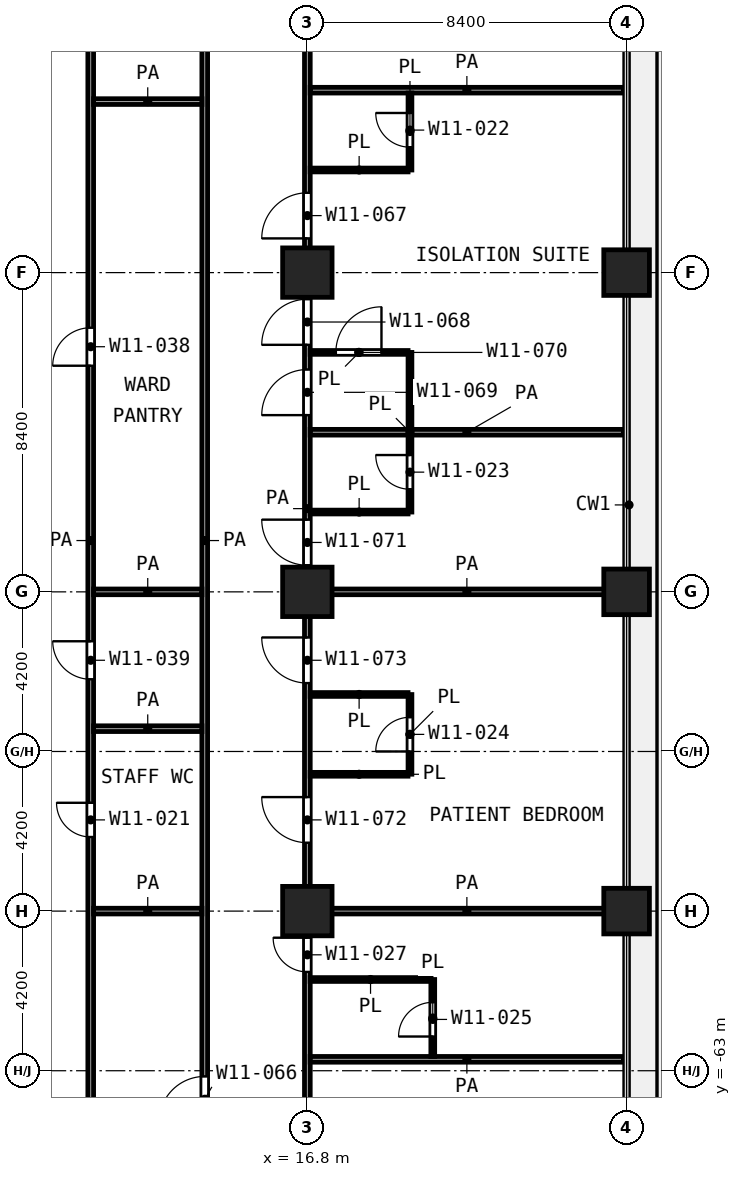
"""IFC4 building model, lengths in metres.
Left out: names, types, materials, properties, quantities, classifications, styles, units other than length and angle.
Written with IfcOpenShell. Run it as: python <this file> out.ifc"""

import sys

from ifc_helpers import new_model, si_unit, direction, frame, frame_2d, origin, origin_2d, place, context, subcontext, project, spatial, rectangle, extrude, element, fill, save


model = new_model("IFC4")
c1 = context("Model", 3, precision=1e-05, world=origin(), true_north=direction((0.0, 1.0)))
c2 = subcontext(c1, "Body", "Model", "MODEL_VIEW")
j1 = project(units=[si_unit("LENGTHUNIT", "METRE"), si_unit("PLANEANGLEUNIT", "RADIAN")], contexts=[c1])
p1 = place(None, origin())
s1 = spatial("IfcSite", under=j1, at=p1, CompositionType="ELEMENT")
p2 = place(p1, origin())
s2 = spatial("IfcBuilding", under=s1, at=p2, CompositionType="ELEMENT")
p3 = place(p2, frame((0.0, 0.0, 51.8)))
s3 = spatial("IfcBuildingStorey", under=s2, at=p3, CompositionType="ELEMENT", Elevation=51.8)
p4 = place(p3, frame((16.8, -42.0, 0.0), z_axis=(0.0, 0.0, 1.0), x_axis=(1.0, 0.0, 0.0)))
e1 = element("IfcColumn", 1, at=p4, inside=s3, PredefinedType="COLUMN", context=c2, shape_type="SweptSolid", body=[
    extrude(rectangle(XDim=1.3, YDim=1.3, at=origin_2d()), origin(), (0.0, 0.0, 1.0), 4.2),
])
p5 = place(p3, frame((25.2, -42.0, 0.0), z_axis=(0.0, 0.0, 1.0), x_axis=(1.0, 0.0, 0.0)))
e2 = element("IfcColumn", 2, at=p5, inside=s3, PredefinedType="COLUMN", context=c2, shape_type="SweptSolid", body=[
    extrude(rectangle(XDim=1.2, YDim=1.2, at=origin_2d()), origin(), (0.0, 0.0, 1.0), 4.2),
])
p6 = place(p3, frame((16.8, -50.4, 0.0), z_axis=(0.0, 0.0, 1.0), x_axis=(1.0, 0.0, 0.0)))
e3 = element("IfcColumn", 3, at=p6, inside=s3, PredefinedType="COLUMN", context=c2, shape_type="SweptSolid", body=[
    extrude(rectangle(XDim=1.3, YDim=1.3, at=origin_2d()), origin(), (0.0, 0.0, 1.0), 4.2),
])
p7 = place(p3, frame((25.2, -50.4, 0.0), z_axis=(0.0, 0.0, 1.0), x_axis=(1.0, 0.0, 0.0)))
e4 = element("IfcColumn", 4, at=p7, inside=s3, PredefinedType="COLUMN", context=c2, shape_type="SweptSolid", body=[
    extrude(rectangle(XDim=1.2, YDim=1.2, at=origin_2d()), origin(), (0.0, 0.0, 1.0), 4.2),
])
p8 = place(p3, frame((16.8, -58.8, 0.0), z_axis=(0.0, 0.0, 1.0), x_axis=(1.0, 0.0, 0.0)))
e5 = element("IfcColumn", 5, at=p8, inside=s3, PredefinedType="COLUMN", context=c2, shape_type="SweptSolid", body=[
    extrude(rectangle(XDim=1.3, YDim=1.3, at=origin_2d()), origin(), (0.0, 0.0, 1.0), 4.2),
])
p9 = place(p3, frame((25.2, -58.8, 0.0), z_axis=(0.0, 0.0, 1.0), x_axis=(1.0, 0.0, 0.0)))
e6 = element("IfcColumn", 6, at=p9, inside=s3, PredefinedType="COLUMN", context=c2, shape_type="SweptSolid", body=[
    extrude(rectangle(XDim=1.2, YDim=1.2, at=origin_2d()), origin(), (0.0, 0.0, 1.0), 4.2),
])
p10 = place(p3, frame((16.875, -60.6, 0.0), z_axis=(0.0, 0.0, 1.0), x_axis=(1.0, 0.0, 0.0)))
e7 = element("IfcWall", 7, at=p10, inside=s3, PredefinedType="PARTITIONING", context=c2, shape_type="SweptSolid", body=[
    extrude(rectangle(XDim=3.175, YDim=0.1, at=frame_2d((1.587, 0.0))), origin(), (0.0, 0.0, 1.0), 3.9),
])
p11 = place(p3, frame((16.875, -55.2, 0.0), z_axis=(0.0, 0.0, 1.0), x_axis=(1.0, 0.0, 0.0)))
e8 = element("IfcWall", 8, at=p11, inside=s3, PredefinedType="PARTITIONING", context=c2, shape_type="SweptSolid", body=[
    extrude(rectangle(XDim=2.573, YDim=0.1, at=frame_2d((1.287, 0.0))), origin(), (0.0, 0.0, 1.0), 3.9),
])
p12 = place(p3, frame((16.875, -53.1, 0.0), z_axis=(0.0, 0.0, 1.0), x_axis=(1.0, 0.0, 0.0)))
e9 = element("IfcWall", 9, at=p12, inside=s3, PredefinedType="PARTITIONING", context=c2, shape_type="SweptSolid", body=[
    extrude(rectangle(XDim=2.574, YDim=0.1, at=frame_2d((1.287, 0.0))), origin(), (0.0, 0.0, 1.0), 3.9),
])
p13 = place(p3, frame((16.875, -48.3, 0.0), z_axis=(0.0, 0.0, 1.0), x_axis=(1.0, 0.0, 0.0)))
e10 = element("IfcWall", 10, at=p13, inside=s3, PredefinedType="PARTITIONING", context=c2, shape_type="SweptSolid", body=[
    extrude(rectangle(XDim=2.575, YDim=0.1, at=frame_2d((1.288, 0.0))), origin(), (0.0, 0.0, 1.0), 3.9),
])
p14 = place(p3, frame((16.875, -44.1, 0.0), z_axis=(0.0, 0.0, 1.0), x_axis=(1.0, 0.0, 0.0)))
e11 = element("IfcWall", 11, at=p14, inside=s3, PredefinedType="PARTITIONING", context=c2, shape_type="SweptSolid", body=[
    extrude(rectangle(XDim=2.575, YDim=0.1, at=frame_2d((1.288, 0.0))), origin(), (0.0, 0.0, 1.0), 3.9),
])
p15 = place(p14, frame((0.675, 0.0, 0.0)))
e12 = element("IfcOpeningElement", 12, at=p15, cuts=e11, PredefinedType="OPENING", context=c2, shape_type="SweptSolid", body=[
    extrude(rectangle(XDim=1.2, YDim=2.1, at=frame_2d((0.6, 1.05))), frame((0.0, 0.06, 0.0), z_axis=(0.0, -1.0, 0.0), x_axis=(1.0, 0.0, 0.0)), (0.0, 0.0, 1.0), 0.12),
])
p16 = place(p3, frame((16.875, -39.3, 0.0), z_axis=(0.0, 0.0, 1.0), x_axis=(1.0, 0.0, 0.0)))
e13 = element("IfcWall", 13, at=p16, inside=s3, PredefinedType="PARTITIONING", context=c2, shape_type="SweptSolid", body=[
    extrude(rectangle(XDim=2.575, YDim=0.1, at=frame_2d((1.288, 0.0))), origin(), (0.0, 0.0, 1.0), 3.9),
])
p17 = place(p3, frame((19.5, -55.198, 0.0), z_axis=(0.0, 0.0, 1.0), x_axis=(0.0, 1.0, 0.0)))
e14 = element("IfcWall", 14, at=p17, inside=s3, PredefinedType="PARTITIONING", context=c2, shape_type="SweptSolid", body=[
    extrude(rectangle(XDim=2.096, YDim=0.1, at=frame_2d((1.048, 0.0))), origin(), (0.0, 0.0, 1.0), 3.9),
])
p18 = place(p17, frame((0.598, 0.0, 0.0)))
e15 = element("IfcOpeningElement", 15, at=p18, cuts=e14, PredefinedType="OPENING", context=c2, shape_type="SweptSolid", body=[
    extrude(rectangle(XDim=0.9, YDim=2.1, at=frame_2d((0.45, 1.05))), frame((0.0, 0.06, 0.0), z_axis=(0.0, -1.0, 0.0), x_axis=(1.0, 0.0, 0.0)), (0.0, 0.0, 1.0), 0.12),
])
p19 = place(p3, frame((19.5, -48.3, 0.0), z_axis=(0.0, 0.0, 1.0), x_axis=(0.0, 1.0, 0.0)))
e16 = element("IfcWall", 16, at=p19, inside=s3, PredefinedType="PARTITIONING", context=c2, shape_type="SweptSolid", body=[
    extrude(rectangle(XDim=4.2, YDim=0.1, at=frame_2d((2.1, 0.0))), origin(), (0.0, 0.0, 1.0), 3.9),
])
p20 = place(p19, frame((0.6, 0.0, 0.0)))
e17 = element("IfcOpeningElement", 17, at=p20, cuts=e16, PredefinedType="OPENING", context=c2, shape_type="SweptSolid", body=[
    extrude(rectangle(XDim=0.9, YDim=2.1, at=frame_2d((0.45, 1.05))), frame((0.0, 0.06, 0.0), z_axis=(0.0, -1.0, 0.0), x_axis=(1.0, 0.0, 0.0)), (0.0, 0.0, 1.0), 0.12),
])
p21 = place(p3, frame((19.5, -39.3, 0.0), z_axis=(0.0, 0.0, 1.0), x_axis=(0.0, 1.0, 0.0)))
e18 = element("IfcWall", 18, at=p21, inside=s3, PredefinedType="PARTITIONING", context=c2, shape_type="SweptSolid", body=[
    extrude(rectangle(XDim=2.025, YDim=0.1, at=frame_2d((1.013, 0.0))), origin(), (0.0, 0.0, 1.0), 3.9),
])
p22 = place(p21, frame((0.6, 0.0, 0.0)))
e19 = element("IfcOpeningElement", 19, at=p22, cuts=e18, PredefinedType="OPENING", context=c2, shape_type="SweptSolid", body=[
    extrude(rectangle(XDim=0.9, YDim=2.1, at=frame_2d((0.45, 1.05))), frame((0.0, 0.06, 0.0), z_axis=(0.0, -1.0, 0.0), x_axis=(1.0, 0.0, 0.0)), (0.0, 0.0, 1.0), 0.12),
])
p23 = place(p3, frame((20.1, -62.625, 0.0), z_axis=(0.0, 0.0, 1.0), x_axis=(0.0, 1.0, 0.0)))
e20 = element("IfcWall", 20, at=p23, inside=s3, PredefinedType="PARTITIONING", context=c2, shape_type="SweptSolid", body=[
    extrude(rectangle(XDim=2.025, YDim=0.1, at=frame_2d((1.012, 0.0))), origin(), (0.0, 0.0, 1.0), 3.9),
])
p24 = place(p23, frame((0.525, 0.0, 0.0)))
e21 = element("IfcOpeningElement", 21, at=p24, cuts=e20, PredefinedType="OPENING", context=c2, shape_type="SweptSolid", body=[
    extrude(rectangle(XDim=0.9, YDim=2.1, at=frame_2d((0.45, 1.05))), frame((0.0, 0.06, 0.0), z_axis=(0.0, -1.0, 0.0), x_axis=(1.0, 0.0, 0.0)), (0.0, 0.0, 1.0), 0.12),
])
p25 = place(p3, frame((16.875, -62.7, 0.0), z_axis=(0.0, 0.0, 1.0), x_axis=(1.0, 0.0, 0.0)))
e22 = element("IfcWall", 22, at=p25, inside=s3, PredefinedType="PARTITIONING", context=c2, shape_type="SweptSolid", body=[
    extrude(rectangle(XDim=8.245, YDim=0.15, at=frame_2d((4.123, 0.0))), origin(), (0.0, 0.0, 1.0), 3.9),
])
p26 = place(p3, frame((11.175, -58.8, 0.0), z_axis=(0.0, 0.0, 1.0), x_axis=(1.0, 0.0, 0.0)))
e23 = element("IfcWall", 23, at=p26, inside=s3, PredefinedType="PARTITIONING", context=c2, shape_type="SweptSolid", body=[
    extrude(rectangle(XDim=2.85, YDim=0.15, at=frame_2d((1.425, 0.0))), origin(), (0.0, 0.0, 1.0), 3.9),
])
p27 = place(p3, frame((16.875, -58.8, 0.0), z_axis=(0.0, 0.0, 1.0), x_axis=(1.0, 0.0, 0.0)))
e24 = element("IfcWall", 24, at=p27, inside=s3, PredefinedType="PARTITIONING", context=c2, shape_type="SweptSolid", body=[
    extrude(rectangle(XDim=8.245, YDim=0.15, at=frame_2d((4.123, 0.0))), origin(), (0.0, 0.0, 1.0), 3.9),
])
for number, where, z_axis, x_axis in (
    (25, (11.175, -54.0, 0.0), (0.0, 0.0, 1.0), (1.0, 0.0, 0.0)),
    (26, (11.175, -50.4, 0.0), (0.0, 0.0, 1.0), (1.0, 0.0, 0.0)),
):
    element("IfcWall", number, at=place(p3, frame(where, z_axis=z_axis, x_axis=x_axis)), inside=s3, PredefinedType="PARTITIONING", context=c2, shape_type="SweptSolid", body=[
        extrude(rectangle(XDim=2.85, YDim=0.15, at=frame_2d((1.425, 0.0))), origin(), (0.0, 0.0, 1.0), 3.9),
    ])
for number, where, z_axis, x_axis in (
    (27, (16.875, -50.4, 0.0), (0.0, 0.0, 1.0), (1.0, 0.0, 0.0)),
    (28, (16.875, -46.2, 0.0), (0.0, 0.0, 1.0), (1.0, 0.0, 0.0)),
):
    element("IfcWall", number, at=place(p3, frame(where, z_axis=z_axis, x_axis=x_axis)), inside=s3, PredefinedType="PARTITIONING", context=c2, shape_type="SweptSolid", body=[
        extrude(rectangle(XDim=8.245, YDim=0.15, at=frame_2d((4.123, 0.0))), origin(), (0.0, 0.0, 1.0), 3.9),
    ])
p28 = place(p3, frame((11.175, -37.5, 0.0), z_axis=(0.0, 0.0, 1.0), x_axis=(1.0, 0.0, 0.0)))
e29 = element("IfcWall", 29, at=p28, inside=s3, PredefinedType="PARTITIONING", context=c2, shape_type="SweptSolid", body=[
    extrude(rectangle(XDim=2.85, YDim=0.15, at=frame_2d((1.425, 0.0))), origin(), (0.0, 0.0, 1.0), 3.9),
])
p29 = place(p3, frame((16.875, -37.2, 0.0), z_axis=(0.0, 0.0, 1.0), x_axis=(1.0, 0.0, 0.0)))
e30 = element("IfcWall", 30, at=p29, inside=s3, PredefinedType="PARTITIONING", context=c2, shape_type="SweptSolid", body=[
    extrude(rectangle(XDim=8.245, YDim=0.15, at=frame_2d((4.123, 0.0))), origin(), (0.0, 0.0, 1.0), 3.9),
])
p30 = place(p3, frame((11.1, -68.7, 0.0), z_axis=(0.0, 0.0, 1.0), x_axis=(0.0, 1.0, 0.0)))
e31 = element("IfcWall", 31, at=p30, inside=s3, PredefinedType="PARTITIONING", context=c2, shape_type="SweptSolid", body=[
    extrude(rectangle(XDim=39.3, YDim=0.15, at=frame_2d((19.65, 0.0))), origin(), (0.0, 0.0, 1.0), 3.9),
])
p31 = place(p30, frame((34.75, 0.0, 0.0)))
e32 = element("IfcOpeningElement", 32, at=p31, cuts=e31, PredefinedType="OPENING", context=c2, shape_type="SweptSolid", body=[
    extrude(rectangle(XDim=1.0, YDim=2.1, at=frame_2d((0.5, 1.05))), frame((0.0, 0.085, 0.0), z_axis=(0.0, -1.0, 0.0), x_axis=(1.0, 0.0, 0.0)), (0.0, 0.0, 1.0), 0.17),
])
p32 = place(p30, frame((24.25, 0.0, 0.0)))
e33 = element("IfcOpeningElement", 33, at=p32, cuts=e31, PredefinedType="OPENING", context=c2, shape_type="SweptSolid", body=[
    extrude(rectangle(XDim=1.0, YDim=2.1, at=frame_2d((0.5, 1.05))), frame((0.0, 0.085, 0.0), z_axis=(0.0, -1.0, 0.0), x_axis=(1.0, 0.0, 0.0)), (0.0, 0.0, 1.0), 0.17),
])
p33 = place(p30, frame((16.0, 0.0, 0.0)))
e34 = element("IfcOpeningElement", 34, at=p33, cuts=e31, PredefinedType="OPENING", context=c2, shape_type="SweptSolid", body=[
    extrude(rectangle(XDim=1.0, YDim=2.1, at=frame_2d((0.5, 1.05))), frame((0.0, 0.085, 0.0), z_axis=(0.0, -1.0, 0.0), x_axis=(1.0, 0.0, 0.0)), (0.0, 0.0, 1.0), 0.17),
])
p34 = place(p30, frame((11.85, 0.0, 0.0)))
e35 = element("IfcOpeningElement", 35, at=p34, cuts=e31, PredefinedType="OPENING", context=c2, shape_type="SweptSolid", body=[
    extrude(rectangle(XDim=0.9, YDim=2.1, at=frame_2d((0.45, 1.05))), frame((0.0, 0.085, 0.0), z_axis=(0.0, -1.0, 0.0), x_axis=(1.0, 0.0, 0.0)), (0.0, 0.0, 1.0), 0.17),
])
p35 = place(p3, frame((14.1, -68.7, 0.0), z_axis=(0.0, 0.0, 1.0), x_axis=(0.0, 1.0, 0.0)))
e36 = element("IfcWall", 36, at=p35, inside=s3, PredefinedType="PARTITIONING", context=c2, shape_type="SweptSolid", body=[
    extrude(rectangle(XDim=39.3, YDim=0.15, at=frame_2d((19.65, 0.0))), origin(), (0.0, 0.0, 1.0), 3.9),
])
p36 = place(p35, frame((4.35, 0.0, 0.0)))
e37 = element("IfcOpeningElement", 37, at=p36, cuts=e36, PredefinedType="OPENING", context=c2, shape_type="SweptSolid", body=[
    extrude(rectangle(XDim=1.2, YDim=2.1, at=frame_2d((0.6, 1.05))), frame((0.0, 0.085, 0.0), z_axis=(0.0, -1.0, 0.0), x_axis=(1.0, 0.0, 0.0)), (0.0, 0.0, 1.0), 0.17),
])
p37 = place(p3, frame((16.8, -71.32, 0.0), z_axis=(0.0, 0.0, 1.0), x_axis=(0.0, 1.0, 0.0)))
e38 = element("IfcWall", 38, at=p37, inside=s3, PredefinedType="PARTITIONING", context=c2, shape_type="SweptSolid", body=[
    extrude(rectangle(XDim=46.22, YDim=0.15, at=frame_2d((23.11, 0.0))), origin(), (0.0, 0.0, 1.0), 3.9),
])
p38 = place(p37, frame((38.42, 0.0, 0.0)))
e39 = element("IfcOpeningElement", 39, at=p38, cuts=e38, PredefinedType="OPENING", context=c2, shape_type="SweptSolid", body=[
    extrude(rectangle(XDim=1.0, YDim=2.1, at=frame_2d((0.5, 1.05))), frame((0.0, 0.085, 0.0), z_axis=(0.0, -1.0, 0.0), x_axis=(1.0, 0.0, 0.0)), (0.0, 0.0, 1.0), 0.17),
])
p39 = place(p37, frame((30.22, 0.0, 0.0)))
e40 = element("IfcOpeningElement", 40, at=p39, cuts=e38, PredefinedType="OPENING", context=c2, shape_type="SweptSolid", body=[
    extrude(rectangle(XDim=1.2, YDim=2.1, at=frame_2d((0.6, 1.05))), frame((0.0, 0.085, 0.0), z_axis=(0.0, -1.0, 0.0), x_axis=(1.0, 0.0, 0.0)), (0.0, 0.0, 1.0), 0.17),
])
p40 = place(p37, frame((27.42, 0.0, 0.0)))
e41 = element("IfcOpeningElement", 41, at=p40, cuts=e38, PredefinedType="OPENING", context=c2, shape_type="SweptSolid", body=[
    extrude(rectangle(XDim=1.2, YDim=2.1, at=frame_2d((0.6, 1.05))), frame((0.0, 0.085, 0.0), z_axis=(0.0, -1.0, 0.0), x_axis=(1.0, 0.0, 0.0)), (0.0, 0.0, 1.0), 0.17),
])
p41 = place(p37, frame((25.57, 0.0, 0.0)))
e42 = element("IfcOpeningElement", 42, at=p41, cuts=e38, PredefinedType="OPENING", context=c2, shape_type="SweptSolid", body=[
    extrude(rectangle(XDim=1.2, YDim=2.1, at=frame_2d((0.6, 1.05))), frame((0.0, 0.085, 0.0), z_axis=(0.0, -1.0, 0.0), x_axis=(1.0, 0.0, 0.0)), (0.0, 0.0, 1.0), 0.17),
])
p42 = place(p37, frame((21.62, 0.0, 0.0)))
e43 = element("IfcOpeningElement", 43, at=p42, cuts=e38, PredefinedType="OPENING", context=c2, shape_type="SweptSolid", body=[
    extrude(rectangle(XDim=1.2, YDim=2.1, at=frame_2d((0.6, 1.05))), frame((0.0, 0.085, 0.0), z_axis=(0.0, -1.0, 0.0), x_axis=(1.0, 0.0, 0.0)), (0.0, 0.0, 1.0), 0.17),
])
p43 = place(p37, frame((14.32, 0.0, 0.0)))
e44 = element("IfcOpeningElement", 44, at=p43, cuts=e38, PredefinedType="OPENING", context=c2, shape_type="SweptSolid", body=[
    extrude(rectangle(XDim=1.2, YDim=2.1, at=frame_2d((0.6, 1.05))), frame((0.0, 0.085, 0.0), z_axis=(0.0, -1.0, 0.0), x_axis=(1.0, 0.0, 0.0)), (0.0, 0.0, 1.0), 0.17),
])
p44 = place(p37, frame((18.52, 0.0, 0.0)))
e45 = element("IfcOpeningElement", 45, at=p44, cuts=e38, PredefinedType="OPENING", context=c2, shape_type="SweptSolid", body=[
    extrude(rectangle(XDim=1.2, YDim=2.1, at=frame_2d((0.6, 1.05))), frame((0.0, 0.085, 0.0), z_axis=(0.0, -1.0, 0.0), x_axis=(1.0, 0.0, 0.0)), (0.0, 0.0, 1.0), 0.17),
])
p45 = place(p37, frame((10.92, 0.0, 0.0)))
e46 = element("IfcOpeningElement", 46, at=p45, cuts=e38, PredefinedType="OPENING", context=c2, shape_type="SweptSolid", body=[
    extrude(rectangle(XDim=0.9, YDim=2.1, at=frame_2d((0.45, 1.05))), frame((0.0, 0.085, 0.0), z_axis=(0.0, -1.0, 0.0), x_axis=(1.0, 0.0, 0.0)), (0.0, 0.0, 1.0), 0.17),
])
p46 = place(p37, frame((4.82, 0.0, 0.0)))
e47 = element("IfcOpeningElement", 47, at=p46, cuts=e38, PredefinedType="OPENING", context=c2, shape_type="SweptSolid", body=[
    extrude(rectangle(XDim=1.5, YDim=2.1, at=frame_2d((0.75, 1.05))), frame((0.0, 0.085, 0.0), z_axis=(0.0, -1.0, 0.0), x_axis=(1.0, 0.0, 0.0)), (0.0, 0.0, 1.0), 0.17),
])
p47 = place(p32, origin())
e48 = element("IfcDoor", 48, at=p47, inside=s3, OperationType="SINGLE_SWING_LEFT", PredefinedType="DOOR", context=c2, shape_type="SweptSolid", body=[
    extrude(rectangle(XDim=1.0, YDim=2.1, at=frame_2d((0.5, 1.05))), frame((0.0, 0.025, 0.0), z_axis=(0.0, -1.0, 0.0), x_axis=(1.0, 0.0, 0.0)), (0.0, 0.0, 1.0), 0.05),
])
fill(e33, e48)
p48 = place(p33, origin())
e49 = element("IfcDoor", 49, at=p48, inside=s3, OperationType="SINGLE_SWING_RIGHT", PredefinedType="DOOR", context=c2, shape_type="SweptSolid", body=[
    extrude(rectangle(XDim=1.0, YDim=2.1, at=frame_2d((0.5, 1.05))), frame((0.0, 0.025, 0.0), z_axis=(0.0, -1.0, 0.0), x_axis=(1.0, 0.0, 0.0)), (0.0, 0.0, 1.0), 0.05),
])
fill(e34, e49)
p49 = place(p34, origin())
e50 = element("IfcDoor", 50, at=p49, inside=s3, OperationType="SINGLE_SWING_RIGHT", PredefinedType="DOOR", context=c2, shape_type="SweptSolid", body=[
    extrude(rectangle(XDim=0.9, YDim=2.1, at=frame_2d((0.45, 1.05))), frame((0.0, 0.025, 0.0), z_axis=(0.0, -1.0, 0.0), x_axis=(1.0, 0.0, 0.0)), (0.0, 0.0, 1.0), 0.05),
])
fill(e35, e50)
p50 = place(p36, origin())
e51 = element("IfcDoor", 51, at=p50, inside=s3, OperationType="SINGLE_SWING_LEFT", PredefinedType="DOOR", context=c2, shape_type="SweptSolid", body=[
    extrude(rectangle(XDim=1.2, YDim=2.1, at=frame_2d((0.6, 1.05))), frame((0.0, 0.025, 0.0), z_axis=(0.0, -1.0, 0.0), x_axis=(1.0, 0.0, 0.0)), (0.0, 0.0, 1.0), 0.05),
])
fill(e37, e51)
p51 = place(p39, origin())
e52 = element("IfcDoor", 52, at=p51, inside=s3, OperationType="SINGLE_SWING_LEFT", PredefinedType="DOOR", context=c2, shape_type="SweptSolid", body=[
    extrude(rectangle(XDim=1.2, YDim=2.1, at=frame_2d((0.6, 1.05))), frame((0.0, 0.025, 0.0), z_axis=(0.0, -1.0, 0.0), x_axis=(1.0, 0.0, 0.0)), (0.0, 0.0, 1.0), 0.05),
])
fill(e40, e52)
p52 = place(p40, origin())
e53 = element("IfcDoor", 53, at=p52, inside=s3, OperationType="SINGLE_SWING_LEFT", PredefinedType="DOOR", context=c2, shape_type="SweptSolid", body=[
    extrude(rectangle(XDim=1.2, YDim=2.1, at=frame_2d((0.6, 1.05))), frame((0.0, 0.025, 0.0), z_axis=(0.0, -1.0, 0.0), x_axis=(1.0, 0.0, 0.0)), (0.0, 0.0, 1.0), 0.05),
])
fill(e41, e53)
p53 = place(p41, origin())
e54 = element("IfcDoor", 54, at=p53, inside=s3, OperationType="SINGLE_SWING_LEFT", PredefinedType="DOOR", context=c2, shape_type="SweptSolid", body=[
    extrude(rectangle(XDim=1.2, YDim=2.1, at=frame_2d((0.6, 1.05))), frame((0.0, 0.025, 0.0), z_axis=(0.0, -1.0, 0.0), x_axis=(1.0, 0.0, 0.0)), (0.0, 0.0, 1.0), 0.05),
])
fill(e42, e54)
p54 = place(p15, origin())
e55 = element("IfcDoor", 55, at=p54, inside=s3, OperationType="SINGLE_SWING_RIGHT", PredefinedType="DOOR", context=c2, shape_type="SweptSolid", body=[
    extrude(rectangle(XDim=1.2, YDim=2.1, at=frame_2d((0.6, 1.05))), frame((0.0, 0.025, 0.0), z_axis=(0.0, -1.0, 0.0), x_axis=(1.0, 0.0, 0.0)), (0.0, 0.0, 1.0), 0.05),
])
fill(e12, e55)
p55 = place(p22, origin())
e56 = element("IfcDoor", 56, at=p55, inside=s3, OperationType="SINGLE_SWING_RIGHT", PredefinedType="DOOR", context=c2, shape_type="SweptSolid", body=[
    extrude(rectangle(XDim=0.9, YDim=2.1, at=frame_2d((0.45, 1.05))), frame((0.0, 0.025, 0.0), z_axis=(0.0, -1.0, 0.0), x_axis=(1.0, 0.0, 0.0)), (0.0, 0.0, 1.0), 0.05),
])
fill(e19, e56)
p56 = place(p42, origin())
e57 = element("IfcDoor", 57, at=p56, inside=s3, OperationType="SINGLE_SWING_RIGHT", PredefinedType="DOOR", context=c2, shape_type="SweptSolid", body=[
    extrude(rectangle(XDim=1.2, YDim=2.1, at=frame_2d((0.6, 1.05))), frame((0.0, 0.025, 0.0), z_axis=(0.0, -1.0, 0.0), x_axis=(1.0, 0.0, 0.0)), (0.0, 0.0, 1.0), 0.05),
])
fill(e43, e57)
p57 = place(p20, origin())
e58 = element("IfcDoor", 58, at=p57, inside=s3, OperationType="SINGLE_SWING_RIGHT", PredefinedType="DOOR", context=c2, shape_type="SweptSolid", body=[
    extrude(rectangle(XDim=0.9, YDim=2.1, at=frame_2d((0.45, 1.05))), frame((0.0, 0.025, 0.0), z_axis=(0.0, -1.0, 0.0), x_axis=(1.0, 0.0, 0.0)), (0.0, 0.0, 1.0), 0.05),
])
fill(e17, e58)
p58 = place(p43, origin())
e59 = element("IfcDoor", 59, at=p58, inside=s3, OperationType="SINGLE_SWING_RIGHT", PredefinedType="DOOR", context=c2, shape_type="SweptSolid", body=[
    extrude(rectangle(XDim=1.2, YDim=2.1, at=frame_2d((0.6, 1.05))), frame((0.0, 0.025, 0.0), z_axis=(0.0, -1.0, 0.0), x_axis=(1.0, 0.0, 0.0)), (0.0, 0.0, 1.0), 0.05),
])
fill(e44, e59)
p59 = place(p44, origin())
e60 = element("IfcDoor", 60, at=p59, inside=s3, OperationType="SINGLE_SWING_RIGHT", PredefinedType="DOOR", context=c2, shape_type="SweptSolid", body=[
    extrude(rectangle(XDim=1.2, YDim=2.1, at=frame_2d((0.6, 1.05))), frame((0.0, 0.025, 0.0), z_axis=(0.0, -1.0, 0.0), x_axis=(1.0, 0.0, 0.0)), (0.0, 0.0, 1.0), 0.05),
])
fill(e45, e60)
p60 = place(p18, origin())
e61 = element("IfcDoor", 61, at=p60, inside=s3, OperationType="SINGLE_SWING_LEFT", PredefinedType="DOOR", context=c2, shape_type="SweptSolid", body=[
    extrude(rectangle(XDim=0.9, YDim=2.1, at=frame_2d((0.45, 1.05))), frame((0.0, 0.025, 0.0), z_axis=(0.0, -1.0, 0.0), x_axis=(1.0, 0.0, 0.0)), (0.0, 0.0, 1.0), 0.05),
])
fill(e15, e61)
p61 = place(p45, origin())
e62 = element("IfcDoor", 62, at=p61, inside=s3, OperationType="SINGLE_SWING_RIGHT", PredefinedType="DOOR", context=c2, shape_type="SweptSolid", body=[
    extrude(rectangle(XDim=0.9, YDim=2.1, at=frame_2d((0.45, 1.05))), frame((0.0, 0.025, 0.0), z_axis=(0.0, -1.0, 0.0), x_axis=(1.0, 0.0, 0.0)), (0.0, 0.0, 1.0), 0.05),
])
fill(e46, e62)
p62 = place(p24, origin())
e63 = element("IfcDoor", 63, at=p62, inside=s3, OperationType="SINGLE_SWING_LEFT", PredefinedType="DOOR", context=c2, shape_type="SweptSolid", body=[
    extrude(rectangle(XDim=0.9, YDim=2.1, at=frame_2d((0.45, 1.05))), frame((0.0, 0.025, 0.0), z_axis=(0.0, -1.0, 0.0), x_axis=(1.0, 0.0, 0.0)), (0.0, 0.0, 1.0), 0.05),
])
fill(e21, e63)
save(model, sys.argv[1])
